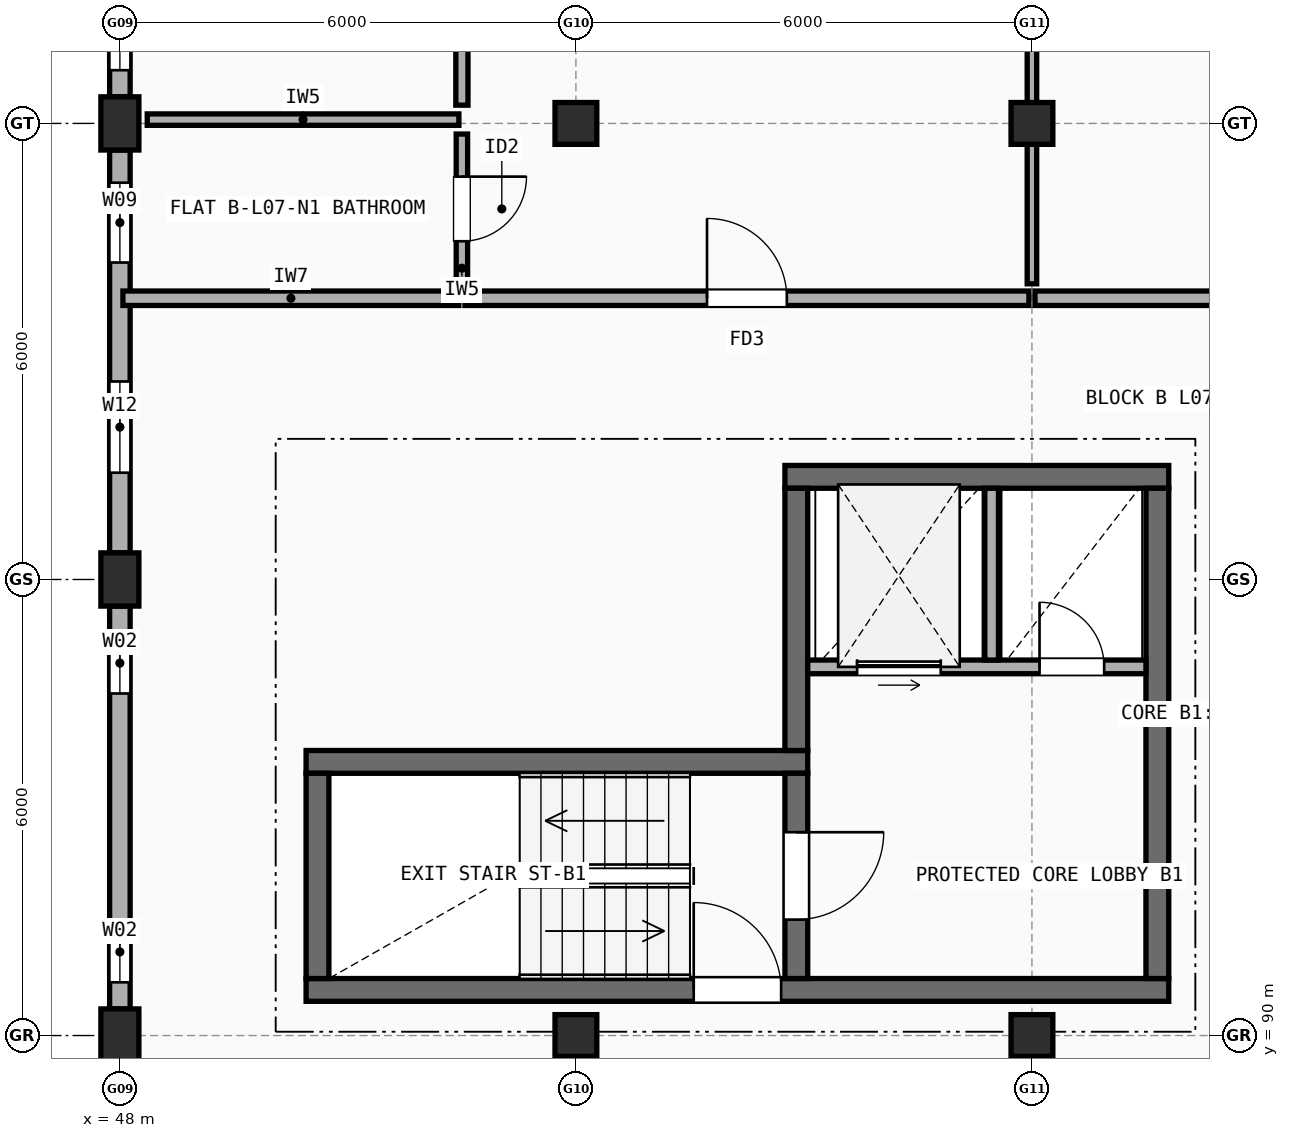
"""IFC4 building model, lengths in metres.
Left out: names, types, materials, properties, quantities, classifications, styles, units other than length and angle.
Written with IfcOpenShell. Run it as: python <this file> out.ifc"""

import sys

from ifc_helpers import new_model, si_unit, direction, frame, frame_2d, origin, origin_2d, place, context, subcontext, project, spatial, rectangle, extrude, element, fill, save


model = new_model("IFC4")
c1 = context("Model", 3, precision=1e-05, world=origin(), true_north=direction((0.0, 1.0)))
c2 = subcontext(c1, "Body", "Model", "MODEL_VIEW")
j1 = project(units=[si_unit("LENGTHUNIT", "METRE"), si_unit("PLANEANGLEUNIT", "RADIAN")], contexts=[c1])
p1 = place(None, origin())
s1 = spatial("IfcSite", under=j1, at=p1, CompositionType="ELEMENT")
p2 = place(p1, origin())
s2 = spatial("IfcBuilding", under=s1, at=p2, CompositionType="ELEMENT")
p3 = place(p2, frame((0.0, 0.0, 23.7)))
s3 = spatial("IfcBuildingStorey", under=s2, at=p3, CompositionType="ELEMENT", Elevation=23.7)
for number, where, z_axis, x_axis in (
    (1, (48.0, 90.0, 0.0), (0.0, 0.0, 1.0), (1.0, 0.0, 0.0)),
    (2, (48.0, 96.0, 0.0), (0.0, 0.0, 1.0), (1.0, 0.0, 0.0)),
    (3, (48.0, 102.0, 0.0), (0.0, 0.0, 1.0), (1.0, 0.0, 0.0)),
):
    element("IfcColumn", number, at=place(p3, frame(where, z_axis=z_axis, x_axis=x_axis)), inside=s3, PredefinedType="COLUMN", context=c2, shape_type="SweptSolid", body=[
        extrude(rectangle(XDim=0.5, YDim=0.7, at=origin_2d()), origin(), (0.0, 0.0, 1.0), 2.975),
    ])
for number, where, z_axis, x_axis in (
    (4, (54.0, 90.0, 0.0), (0.0, 0.0, 1.0), (1.0, 0.0, 0.0)),
    (5, (54.0, 102.0, 0.0), (0.0, 0.0, 1.0), (1.0, 0.0, 0.0)),
    (6, (60.0, 90.0, 0.0), (0.0, 0.0, 1.0), (1.0, 0.0, 0.0)),
    (7, (60.0, 102.0, 0.0), (0.0, 0.0, 1.0), (1.0, 0.0, 0.0)),
):
    element("IfcColumn", number, at=place(p3, frame(where, z_axis=z_axis, x_axis=x_axis)), inside=s3, PredefinedType="COLUMN", context=c2, shape_type="SweptSolid", body=[
        extrude(rectangle(XDim=0.55, YDim=0.55, at=origin_2d()), origin(), (0.0, 0.0, 1.0), 2.975),
    ])
p4 = place(p3, frame((48.0, 107.65, 0.0), z_axis=(0.0, 0.0, 1.0), x_axis=(0.0, -1.0, 0.0)))
e8 = element("IfcWall", 8, at=p4, inside=s3, PredefinedType="STANDARD", context=c2, shape_type="SweptSolid", body=[
    extrude(rectangle(XDim=5.3, YDim=0.27, at=frame_2d((2.65, 0.0))), origin(), (0.0, 0.0, 1.0), 2.457),
])
p5 = place(p4, frame((0.35, 0.0, 0.9)))
e9 = element("IfcOpeningElement", 9, at=p5, cuts=e8, PredefinedType="OPENING", context=c2, shape_type="SweptSolid", body=[
    extrude(rectangle(XDim=0.9, YDim=1.3, at=frame_2d((0.45, 0.65))), frame((0.0, 0.145, 0.0), z_axis=(0.0, -1.0, 0.0), x_axis=(1.0, 0.0, 0.0)), (0.0, 0.0, 1.0), 0.29),
])
p6 = place(p4, frame((4.05, 0.0, 0.9)))
e10 = element("IfcOpeningElement", 10, at=p6, cuts=e8, PredefinedType="OPENING", context=c2, shape_type="SweptSolid", body=[
    extrude(rectangle(XDim=0.9, YDim=1.3, at=frame_2d((0.45, 0.65))), frame((0.0, 0.145, 0.0), z_axis=(0.0, -1.0, 0.0), x_axis=(1.0, 0.0, 0.0)), (0.0, 0.0, 1.0), 0.29),
])
p7 = place(p3, frame((48.0, 101.65, 0.0), z_axis=(0.0, 0.0, 1.0), x_axis=(0.0, -1.0, 0.0)))
e11 = element("IfcWall", 11, at=p7, inside=s3, PredefinedType="STANDARD", context=c2, shape_type="SweptSolid", body=[
    extrude(rectangle(XDim=5.3, YDim=0.27, at=frame_2d((2.65, 0.0))), origin(), (0.0, 0.0, 1.0), 2.457),
])
p8 = place(p7, frame((0.43, 0.0, 0.9)))
e12 = element("IfcOpeningElement", 12, at=p8, cuts=e11, PredefinedType="OPENING", context=c2, shape_type="SweptSolid", body=[
    extrude(rectangle(XDim=1.05, YDim=1.35, at=frame_2d((0.525, 0.675))), frame((0.0, 0.145, 0.0), z_axis=(0.0, -1.0, 0.0), x_axis=(1.0, 0.0, 0.0)), (0.0, 0.0, 1.0), 0.29),
])
p9 = place(p7, frame((3.045, 0.0, 0.9)))
e13 = element("IfcOpeningElement", 13, at=p9, cuts=e11, PredefinedType="OPENING", context=c2, shape_type="SweptSolid", body=[
    extrude(rectangle(XDim=1.2, YDim=1.35, at=frame_2d((0.6, 0.675))), frame((0.0, 0.145, 0.0), z_axis=(0.0, -1.0, 0.0), x_axis=(1.0, 0.0, 0.0)), (0.0, 0.0, 1.0), 0.29),
])
p10 = place(p3, frame((48.0, 95.65, 0.0), z_axis=(0.0, 0.0, 1.0), x_axis=(0.0, -1.0, 0.0)))
e14 = element("IfcWall", 14, at=p10, inside=s3, PredefinedType="STANDARD", context=c2, shape_type="SweptSolid", body=[
    extrude(rectangle(XDim=5.3, YDim=0.27, at=frame_2d((2.65, 0.0))), origin(), (0.0, 0.0, 1.0), 2.457),
])
p11 = place(p10, frame((0.35, 0.0, 0.9)))
e15 = element("IfcOpeningElement", 15, at=p11, cuts=e14, PredefinedType="OPENING", context=c2, shape_type="SweptSolid", body=[
    extrude(rectangle(XDim=0.8, YDim=1.2, at=frame_2d((0.4, 0.6))), frame((0.0, 0.145, 0.0), z_axis=(0.0, -1.0, 0.0), x_axis=(1.0, 0.0, 0.0)), (0.0, 0.0, 1.0), 0.29),
])
p12 = place(p10, frame((4.15, 0.0, 0.9)))
e16 = element("IfcOpeningElement", 16, at=p12, cuts=e14, PredefinedType="OPENING", context=c2, shape_type="SweptSolid", body=[
    extrude(rectangle(XDim=0.8, YDim=1.2, at=frame_2d((0.4, 0.6))), frame((0.0, 0.145, 0.0), z_axis=(0.0, -1.0, 0.0), x_axis=(1.0, 0.0, 0.0)), (0.0, 0.0, 1.0), 0.29),
])
p13 = place(p3, frame((50.45, 90.6, 0.0), z_axis=(0.0, 0.0, 1.0), x_axis=(1.0, 0.0, 0.0)))
e17 = element("IfcWall", 17, at=p13, inside=s3, PredefinedType="SHEAR", context=c2, shape_type="SweptSolid", body=[
    extrude(rectangle(XDim=11.35, YDim=0.3, at=frame_2d((5.675, 0.0))), origin(), (0.0, 0.0, 1.0), 2.975),
])
p14 = place(p13, frame((5.1, 0.0, 0.0)))
e18 = element("IfcOpeningElement", 18, at=p14, cuts=e17, PredefinedType="OPENING", context=c2, shape_type="SweptSolid", body=[
    extrude(rectangle(XDim=1.15, YDim=2.15, at=frame_2d((0.575, 1.075))), frame((0.0, 0.16, 0.0), z_axis=(0.0, -1.0, 0.0), x_axis=(1.0, 0.0, 0.0)), (0.0, 0.0, 1.0), 0.32),
])
p15 = place(p3, frame((57.05, 93.6, 0.0), z_axis=(0.0, 0.0, 1.0), x_axis=(-1.0, 0.0, 0.0)))
e19 = element("IfcWall", 19, at=p15, inside=s3, PredefinedType="SHEAR", context=c2, shape_type="SweptSolid", body=[
    extrude(rectangle(XDim=6.6, YDim=0.3, at=frame_2d((3.3, 0.0))), origin(), (0.0, 0.0, 1.0), 2.975),
])
p16 = place(p3, frame((50.6, 93.45, 0.0), z_axis=(0.0, 0.0, 1.0), x_axis=(0.0, -1.0, 0.0)))
e20 = element("IfcWall", 20, at=p16, inside=s3, PredefinedType="SHEAR", context=c2, shape_type="SweptSolid", body=[
    extrude(rectangle(XDim=2.7, YDim=0.3, at=frame_2d((1.35, 0.0))), origin(), (0.0, 0.0, 1.0), 2.975),
])
p17 = place(p3, frame((56.9, 90.75, 0.0), z_axis=(0.0, 0.0, 1.0), x_axis=(0.0, 1.0, 0.0)))
e21 = element("IfcWall", 21, at=p17, inside=s3, PredefinedType="SHEAR", context=c2, shape_type="SweptSolid", body=[
    extrude(rectangle(XDim=2.7, YDim=0.3, at=frame_2d((1.35, 0.0))), origin(), (0.0, 0.0, 1.0), 2.975),
])
p18 = place(p17, frame((0.775, 0.0, 0.0)))
e22 = element("IfcOpeningElement", 22, at=p18, cuts=e21, PredefinedType="OPENING", context=c2, shape_type="SweptSolid", body=[
    extrude(rectangle(XDim=1.15, YDim=2.15, at=frame_2d((0.575, 1.075))), frame((0.0, 0.16, 0.0), z_axis=(0.0, -1.0, 0.0), x_axis=(1.0, 0.0, 0.0)), (0.0, 0.0, 1.0), 0.32),
])
p19 = place(p3, frame((61.8, 97.35, 0.0), z_axis=(0.0, 0.0, 1.0), x_axis=(-1.0, 0.0, 0.0)))
e23 = element("IfcWall", 23, at=p19, inside=s3, PredefinedType="SHEAR", context=c2, shape_type="SweptSolid", body=[
    extrude(rectangle(XDim=5.05, YDim=0.3, at=frame_2d((2.525, 0.0))), origin(), (0.0, 0.0, 1.0), 2.975),
])
p20 = place(p3, frame((61.65, 90.75, 0.0), z_axis=(0.0, 0.0, 1.0), x_axis=(0.0, 1.0, 0.0)))
e24 = element("IfcWall", 24, at=p20, inside=s3, PredefinedType="SHEAR", context=c2, shape_type="SweptSolid", body=[
    extrude(rectangle(XDim=6.45, YDim=0.3, at=frame_2d((3.225, 0.0))), origin(), (0.0, 0.0, 1.0), 2.975),
])
p21 = place(p3, frame((56.9, 93.75, 0.0), z_axis=(0.0, 0.0, 1.0), x_axis=(0.0, 1.0, 0.0)))
e25 = element("IfcWall", 25, at=p21, inside=s3, PredefinedType="SHEAR", context=c2, shape_type="SweptSolid", body=[
    extrude(rectangle(XDim=3.45, YDim=0.3, at=frame_2d((1.725, 0.0))), origin(), (0.0, 0.0, 1.0), 2.975),
])
p22 = place(p3, frame((57.05, 94.85, 0.0), z_axis=(0.0, 0.0, 1.0), x_axis=(1.0, 0.0, 0.0)))
e26 = element("IfcWall", 26, at=p22, inside=s3, PredefinedType="SOLIDWALL", context=c2, shape_type="SweptSolid", body=[
    extrude(rectangle(XDim=4.45, YDim=0.18, at=frame_2d((2.225, 0.0))), origin(), (0.0, 0.0, 1.0), 2.975),
])
p23 = place(p22, frame((0.65, 0.0, 0.0)))
e27 = element("IfcOpeningElement", 27, at=p23, cuts=e26, PredefinedType="OPENING", context=c2, shape_type="SweptSolid", body=[
    extrude(rectangle(XDim=1.1, YDim=2.15, at=frame_2d((0.55, 1.075))), frame((0.0, 0.1, 0.0), z_axis=(0.0, -1.0, 0.0), x_axis=(1.0, 0.0, 0.0)), (0.0, 0.0, 1.0), 0.2),
])
p24 = place(p22, frame((3.05, 0.0, 0.0)))
e28 = element("IfcOpeningElement", 28, at=p24, cuts=e26, PredefinedType="OPENING", context=c2, shape_type="SweptSolid", body=[
    extrude(rectangle(XDim=0.85, YDim=2.1, at=frame_2d((0.425, 1.05))), frame((0.0, 0.1, 0.0), z_axis=(0.0, -1.0, 0.0), x_axis=(1.0, 0.0, 0.0)), (0.0, 0.0, 1.0), 0.2),
])
p25 = place(p3, frame((59.47, 94.94, 0.0), z_axis=(0.0, 0.0, 1.0), x_axis=(0.0, 1.0, 0.0)))
e29 = element("IfcWall", 29, at=p25, inside=s3, PredefinedType="SOLIDWALL", context=c2, shape_type="SweptSolid", body=[
    extrude(rectangle(XDim=2.26, YDim=0.18, at=frame_2d((1.13, 0.0))), origin(), (0.0, 0.0, 1.0), 2.975),
])
p26 = place(p3, frame((48.04, 99.7, 0.0), z_axis=(0.0, 0.0, 1.0), x_axis=(1.0, 0.0, 0.0)))
e30 = element("IfcWall", 30, at=p26, inside=s3, PredefinedType="SOLIDWALL", context=c2, shape_type="SweptSolid", body=[
    extrude(rectangle(XDim=4.42, YDim=0.19, at=frame_2d((2.21, 0.0))), origin(), (0.0, 0.0, 1.0), 2.457),
])
p27 = place(p3, frame((52.54, 99.7, 0.0), z_axis=(0.0, 0.0, 1.0), x_axis=(1.0, 0.0, 0.0)))
e31 = element("IfcWall", 31, at=p27, inside=s3, PredefinedType="SOLIDWALL", context=c2, shape_type="SweptSolid", body=[
    extrude(rectangle(XDim=7.42, YDim=0.19, at=frame_2d((3.71, 0.0))), origin(), (0.0, 0.0, 1.0), 2.508),
])
p28 = place(p27, frame((3.185, 0.0, 0.0)))
e32 = element("IfcOpeningElement", 32, at=p28, cuts=e31, PredefinedType="OPENING", context=c2, shape_type="SweptSolid", body=[
    extrude(rectangle(XDim=1.05, YDim=2.15, at=frame_2d((0.525, 1.075))), frame((0.0, 0.105, 0.0), z_axis=(0.0, -1.0, 0.0), x_axis=(1.0, 0.0, 0.0)), (0.0, 0.0, 1.0), 0.21),
])
p29 = place(p3, frame((52.5, 102.24, 0.0), z_axis=(0.0, 0.0, 1.0), x_axis=(0.0, 1.0, 0.0)))
e33 = element("IfcWall", 33, at=p29, inside=s3, PredefinedType="PLUMBINGWALL", context=c2, shape_type="SweptSolid", body=[
    extrude(rectangle(XDim=7.37, YDim=0.16, at=frame_2d((3.685, 0.0))), origin(), (0.0, 0.0, 1.0), 2.457),
])
p30 = place(p29, frame((3.245, 0.0, 0.0)))
e34 = element("IfcOpeningElement", 34, at=p30, cuts=e33, PredefinedType="OPENING", context=c2, shape_type="SweptSolid", body=[
    extrude(rectangle(XDim=0.88, YDim=2.1, at=frame_2d((0.44, 1.05))), frame((0.0, 0.09, 0.0), z_axis=(0.0, -1.0, 0.0), x_axis=(1.0, 0.0, 0.0)), (0.0, 0.0, 1.0), 0.18),
])
p31 = place(p3, frame((52.5, 99.89, 0.0), z_axis=(0.0, 0.0, 1.0), x_axis=(0.0, 1.0, 0.0)))
e35 = element("IfcWall", 35, at=p31, inside=s3, PredefinedType="PARTITIONING", context=c2, shape_type="SweptSolid", body=[
    extrude(rectangle(XDim=1.97, YDim=0.15, at=frame_2d((0.985, 0.0))), origin(), (0.0, 0.0, 1.0), 2.975),
])
p32 = place(p31, frame((0.56, 0.0, 0.0)))
e36 = element("IfcOpeningElement", 36, at=p32, cuts=e35, PredefinedType="OPENING", context=c2, shape_type="SweptSolid", body=[
    extrude(rectangle(XDim=0.85, YDim=2.1, at=frame_2d((0.425, 1.05))), frame((0.0, 0.085, 0.0), z_axis=(0.0, -1.0, 0.0), x_axis=(1.0, 0.0, 0.0)), (0.0, 0.0, 1.0), 0.17),
])
p33 = place(p3, frame((48.36, 102.05, 0.0), z_axis=(0.0, 0.0, 1.0), x_axis=(1.0, 0.0, 0.0)))
e37 = element("IfcWall", 37, at=p33, inside=s3, PredefinedType="PARTITIONING", context=c2, shape_type="SweptSolid", body=[
    extrude(rectangle(XDim=4.1, YDim=0.15, at=frame_2d((2.05, 0.0))), origin(), (0.0, 0.0, 1.0), 2.457),
])
p34 = place(p3, frame((60.04, 99.7, 0.0), z_axis=(0.0, 0.0, 1.0), x_axis=(1.0, 0.0, 0.0)))
e38 = element("IfcWall", 38, at=p34, inside=s3, PredefinedType="SOLIDWALL", context=c2, shape_type="SweptSolid", body=[
    extrude(rectangle(XDim=2.92, YDim=0.19, at=frame_2d((1.46, 0.0))), origin(), (0.0, 0.0, 1.0), 2.508),
])
p35 = place(p3, frame((60.0, 99.89, 0.0), z_axis=(0.0, 0.0, 1.0), x_axis=(0.0, 1.0, 0.0)))
e39 = element("IfcWall", 39, at=p35, inside=s3, PredefinedType="PARTITIONING", context=c2, shape_type="SweptSolid", body=[
    extrude(rectangle(XDim=13.6, YDim=0.125, at=frame_2d((6.8, 0.0))), origin(), (0.0, 0.0, 1.0), 2.458),
])
p36 = place(p35, frame((6.65, 0.0, 0.0)))
e40 = element("IfcOpeningElement", 40, at=p36, cuts=e39, PredefinedType="OPENING", context=c2, shape_type="SweptSolid", body=[
    extrude(rectangle(XDim=0.88, YDim=2.1, at=frame_2d((0.44, 1.05))), frame((0.0, 0.073, 0.0), z_axis=(0.0, -1.0, 0.0), x_axis=(1.0, 0.0, 0.0)), (0.0, 0.0, 1.0), 0.145),
])
p37 = place(p6, origin())
e41 = element("IfcWindow", 41, at=p37, inside=s3, PartitioningType="SINGLE_PANEL", PredefinedType="WINDOW", context=c2, shape_type="SweptSolid", body=[
    extrude(rectangle(XDim=0.9, YDim=1.3, at=frame_2d((0.45, 0.65))), frame((0.0, 0.03, 0.0), z_axis=(0.0, -1.0, 0.0), x_axis=(1.0, 0.0, 0.0)), (0.0, 0.0, 1.0), 0.06),
])
fill(e10, e41)
p38 = place(p8, origin())
e42 = element("IfcWindow", 42, at=p38, inside=s3, PartitioningType="SINGLE_PANEL", PredefinedType="WINDOW", context=c2, shape_type="SweptSolid", body=[
    extrude(rectangle(XDim=1.05, YDim=1.35, at=frame_2d((0.525, 0.675))), frame((0.0, 0.03, 0.0), z_axis=(0.0, -1.0, 0.0), x_axis=(1.0, 0.0, 0.0)), (0.0, 0.0, 1.0), 0.06),
])
fill(e12, e42)
p39 = place(p9, origin())
e43 = element("IfcWindow", 43, at=p39, inside=s3, PartitioningType="SINGLE_PANEL", PredefinedType="WINDOW", context=c2, shape_type="SweptSolid", body=[
    extrude(rectangle(XDim=1.2, YDim=1.35, at=frame_2d((0.6, 0.675))), frame((0.0, 0.03, 0.0), z_axis=(0.0, -1.0, 0.0), x_axis=(1.0, 0.0, 0.0)), (0.0, 0.0, 1.0), 0.06),
])
fill(e13, e43)
p40 = place(p11, origin())
e44 = element("IfcWindow", 44, at=p40, inside=s3, PartitioningType="SINGLE_PANEL", PredefinedType="WINDOW", context=c2, shape_type="SweptSolid", body=[
    extrude(rectangle(XDim=0.8, YDim=1.2, at=frame_2d((0.4, 0.6))), frame((0.0, 0.03, 0.0), z_axis=(0.0, -1.0, 0.0), x_axis=(1.0, 0.0, 0.0)), (0.0, 0.0, 1.0), 0.06),
])
fill(e15, e44)
p41 = place(p12, origin())
e45 = element("IfcWindow", 45, at=p41, inside=s3, PartitioningType="SINGLE_PANEL", PredefinedType="WINDOW", context=c2, shape_type="SweptSolid", body=[
    extrude(rectangle(XDim=0.8, YDim=1.2, at=frame_2d((0.4, 0.6))), frame((0.0, 0.03, 0.0), z_axis=(0.0, -1.0, 0.0), x_axis=(1.0, 0.0, 0.0)), (0.0, 0.0, 1.0), 0.06),
])
fill(e16, e45)
p42 = place(p14, origin())
e46 = element("IfcDoor", 46, at=p42, inside=s3, OperationType="SINGLE_SWING_LEFT", PredefinedType="DOOR", context=c2, shape_type="SweptSolid", body=[
    extrude(rectangle(XDim=1.15, YDim=2.15, at=frame_2d((0.575, 1.075))), frame((0.0, 0.025, 0.0), z_axis=(0.0, -1.0, 0.0), x_axis=(1.0, 0.0, 0.0)), (0.0, 0.0, 1.0), 0.05),
])
fill(e18, e46)
p43 = place(p18, origin())
e47 = element("IfcDoor", 47, at=p43, inside=s3, OperationType="SINGLE_SWING_RIGHT", PredefinedType="DOOR", context=c2, shape_type="SweptSolid", body=[
    extrude(rectangle(XDim=1.15, YDim=2.15, at=frame_2d((0.575, 1.075))), frame((0.0, 0.025, 0.0), z_axis=(0.0, -1.0, 0.0), x_axis=(1.0, 0.0, 0.0)), (0.0, 0.0, 1.0), 0.05),
])
fill(e22, e47)
p44 = place(p23, origin())
e48 = element("IfcDoor", 48, at=p44, inside=s3, OperationType="SLIDING_TO_LEFT", PredefinedType="DOOR", context=c2, shape_type="SweptSolid", body=[
    extrude(rectangle(XDim=1.1, YDim=2.15, at=frame_2d((0.55, 1.075))), frame((0.0, 0.025, 0.0), z_axis=(0.0, -1.0, 0.0), x_axis=(1.0, 0.0, 0.0)), (0.0, 0.0, 1.0), 0.05),
])
fill(e27, e48)
p45 = place(p24, frame((0.85, 0.0, 0.0), z_axis=(0.0, 0.0, 1.0), x_axis=(-1.0, 0.0, 0.0)))
e49 = element("IfcDoor", 49, at=p45, inside=s3, OperationType="SINGLE_SWING_LEFT", PredefinedType="DOOR", context=c2, shape_type="SweptSolid", body=[
    extrude(rectangle(XDim=0.85, YDim=2.1, at=frame_2d((0.425, 1.05))), frame((0.0, 0.025, 0.0), z_axis=(0.0, -1.0, 0.0), x_axis=(1.0, 0.0, 0.0)), (0.0, 0.0, 1.0), 0.05),
])
fill(e28, e49)
p46 = place(p28, origin())
e50 = element("IfcDoor", 50, at=p46, inside=s3, OperationType="SINGLE_SWING_LEFT", PredefinedType="DOOR", context=c2, shape_type="SweptSolid", body=[
    extrude(rectangle(XDim=1.05, YDim=2.15, at=frame_2d((0.525, 1.075))), frame((0.0, 0.025, 0.0), z_axis=(0.0, -1.0, 0.0), x_axis=(1.0, 0.0, 0.0)), (0.0, 0.0, 1.0), 0.05),
])
fill(e32, e50)
p47 = place(p32, origin())
e51 = element("IfcDoor", 51, at=p47, inside=s3, OperationType="SINGLE_SWING_RIGHT", PredefinedType="DOOR", context=c2, shape_type="SweptSolid", body=[
    extrude(rectangle(XDim=0.85, YDim=2.1, at=frame_2d((0.425, 1.05))), frame((0.0, 0.025, 0.0), z_axis=(0.0, -1.0, 0.0), x_axis=(1.0, 0.0, 0.0)), (0.0, 0.0, 1.0), 0.05),
])
fill(e36, e51)
save(model, sys.argv[1])
